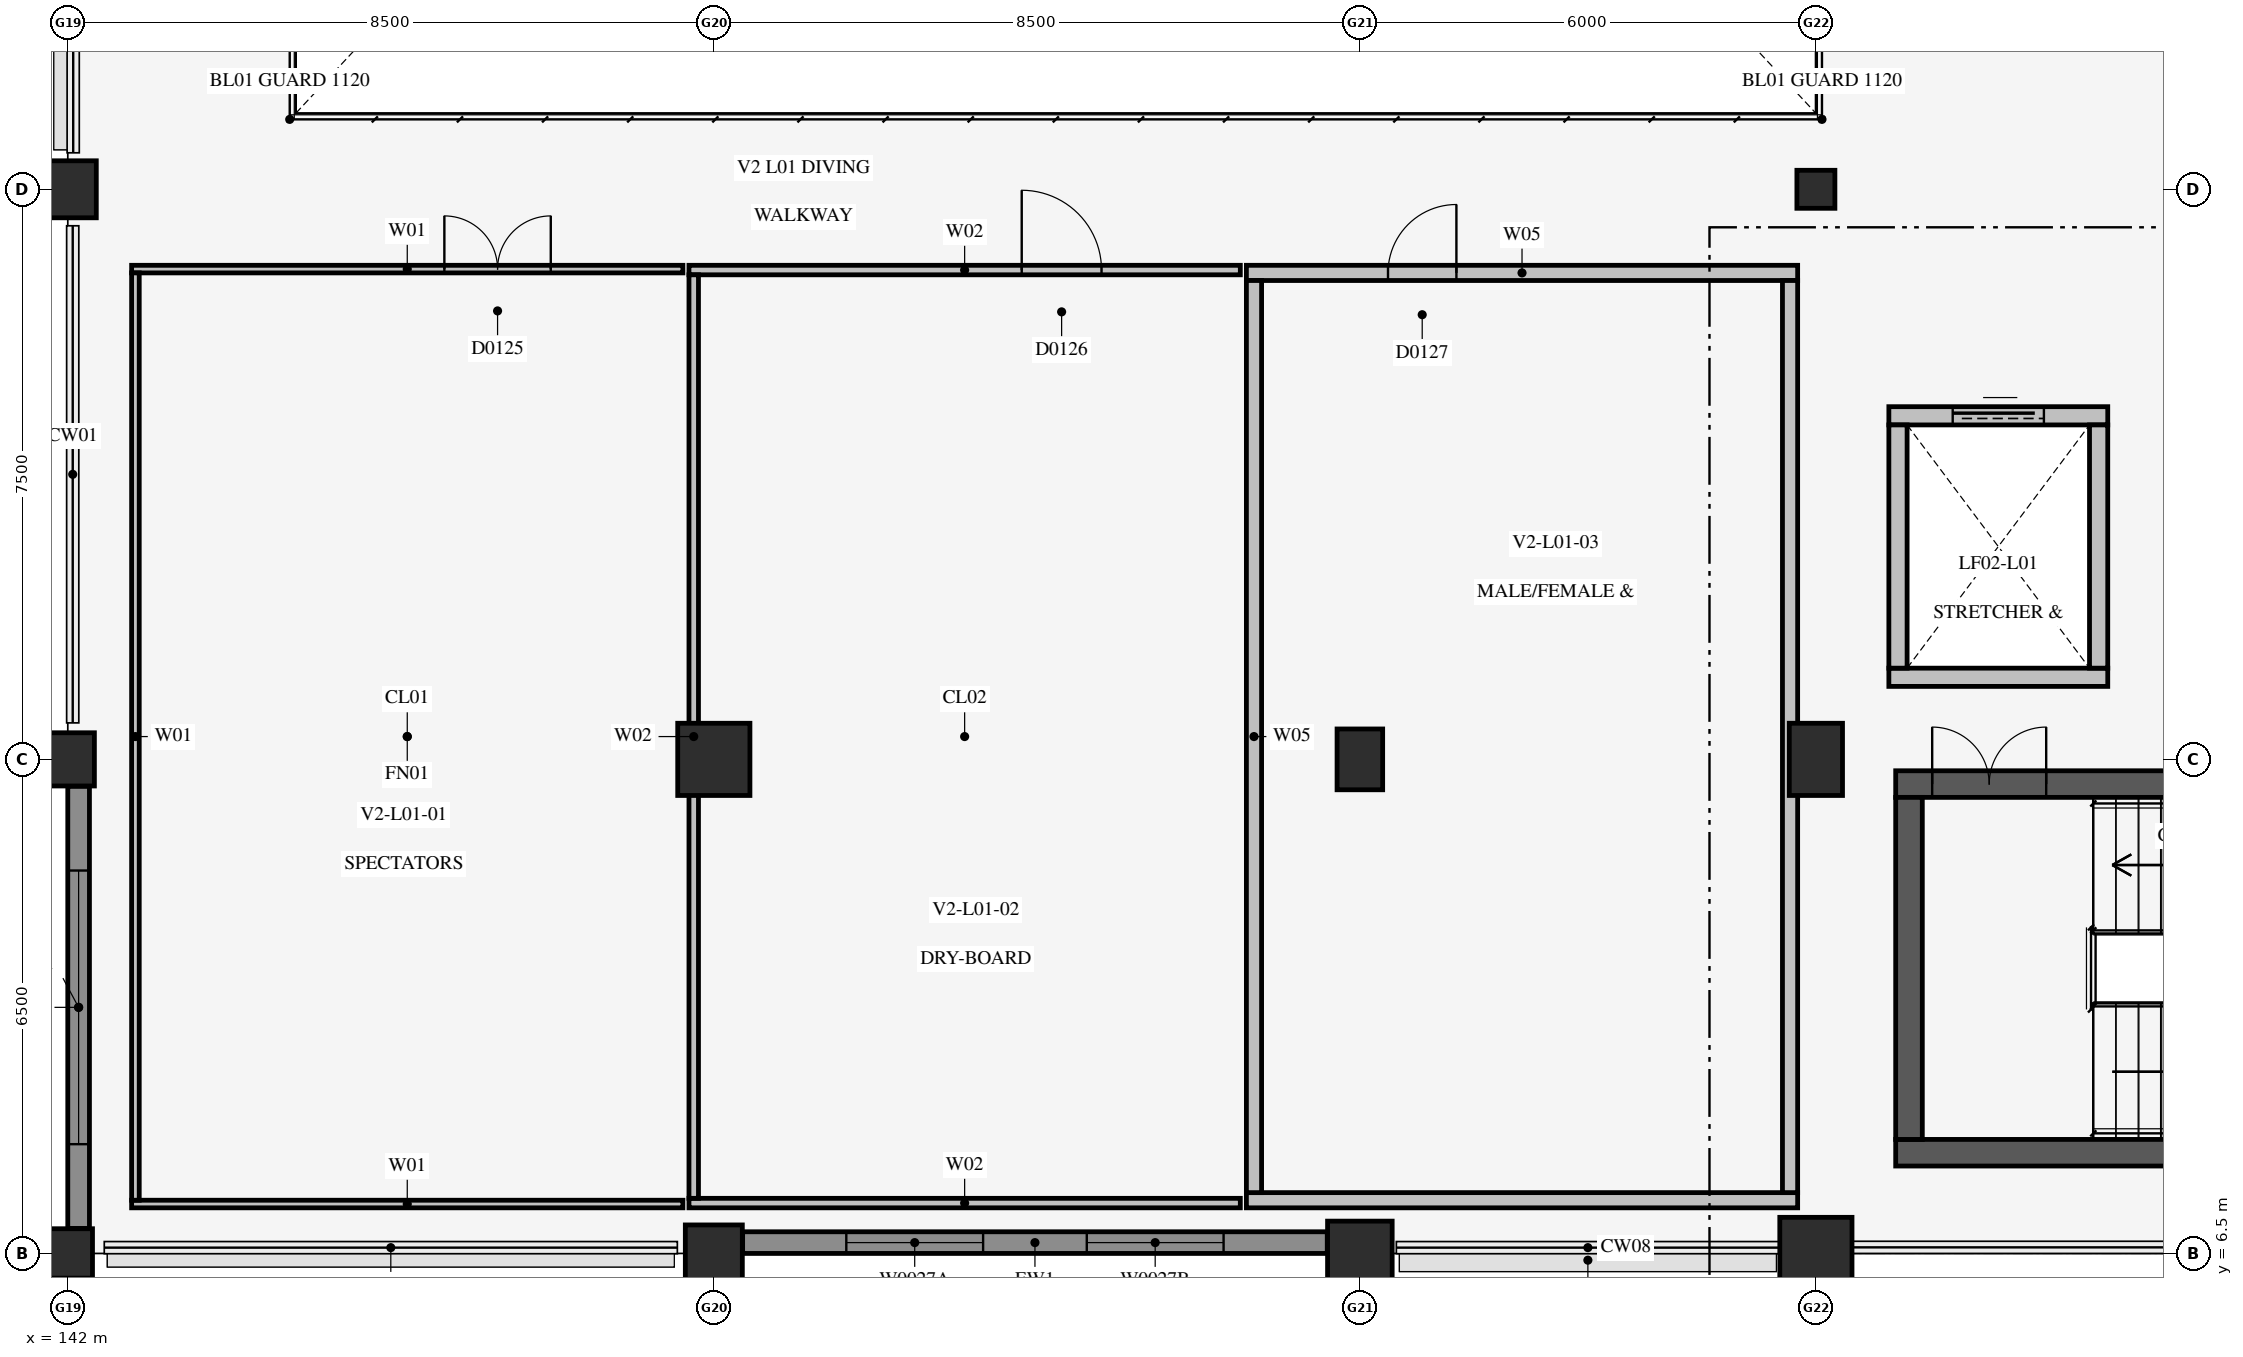
"""IFC4 building model, lengths in metres.
Left out: names, types, materials, properties, quantities, classifications, styles, units other than length and angle.
Written with IfcOpenShell. Run it as: python <this file> out.ifc"""

import sys

from ifc_helpers import new_model, si_unit, direction, frame, frame_2d, origin, origin_2d, place, context, subcontext, project, spatial, rectangle, circle, extrude, element, fill, save


model = new_model("IFC4")
c1 = context("Model", 3, precision=1e-05, world=origin(), true_north=direction((0.0, 1.0)))
c2 = subcontext(c1, "Body", "Model", "MODEL_VIEW")
j1 = project(units=[si_unit("LENGTHUNIT", "METRE"), si_unit("PLANEANGLEUNIT", "RADIAN")], contexts=[c1])
p1 = place(None, origin())
s1 = spatial("IfcSite", under=j1, at=p1, CompositionType="ELEMENT")
p2 = place(p1, origin())
s2 = spatial("IfcBuilding", under=s1, at=p2, CompositionType="ELEMENT")
p3 = place(p2, frame((0.0, 0.0, 5.4)))
s3 = spatial("IfcBuildingStorey", under=s2, at=p3, CompositionType="ELEMENT", Elevation=5.4)
p4 = place(p3, frame((166.05, 7.825, 0.0), z_axis=(0.0, 0.0, 1.0), x_axis=(1.0, 0.0, 0.0)))
e1 = element("IfcWall", 1, at=p4, inside=s3, PredefinedType="SHEAR", context=c2, shape_type="SweptSolid", body=[
    extrude(rectangle(XDim=9.5, YDim=0.35, at=frame_2d((4.75, 0.0))), origin(), (0.0, 0.0, 1.0), 4.56),
])
p5 = place(p3, frame((166.05, 12.675, 0.0), z_axis=(0.0, 0.0, 1.0), x_axis=(1.0, 0.0, 0.0)))
e2 = element("IfcWall", 2, at=p5, inside=s3, PredefinedType="SHEAR", context=c2, shape_type="SweptSolid", body=[
    extrude(rectangle(XDim=9.5, YDim=0.35, at=frame_2d((4.75, 0.0))), origin(), (0.0, 0.0, 1.0), 4.56),
])
p6 = place(p5, frame((0.48, 0.0, 0.0)))
e3 = element("IfcOpeningElement", 3, at=p6, cuts=e2, PredefinedType="OPENING", context=c2, shape_type="SweptSolid", body=[
    extrude(rectangle(XDim=1.5, YDim=2.3, at=frame_2d((0.75, 1.15))), frame((0.0, 0.187, 0.0), z_axis=(0.0, -1.0, 0.0), x_axis=(1.0, 0.0, 0.0)), (0.0, 0.0, 1.0), 0.374),
])
p7 = place(p3, frame((166.225, 8.0, 0.0), z_axis=(0.0, 0.0, 1.0), x_axis=(0.0, 1.0, 0.0)))
e4 = element("IfcWall", 4, at=p7, inside=s3, PredefinedType="SHEAR", context=c2, shape_type="SweptSolid", body=[
    extrude(rectangle(XDim=4.5, YDim=0.35, at=frame_2d((2.25, 0.0))), origin(), (0.0, 0.0, 1.0), 4.56),
])
p8 = place(p3, frame((165.96, 14.08, 0.0), z_axis=(0.0, 0.0, 1.0), x_axis=(1.0, 0.0, 0.0)))
e5 = element("IfcWall", 5, at=p8, inside=s3, PredefinedType="SOLIDWALL", context=c2, shape_type="SweptSolid", body=[
    extrude(rectangle(XDim=2.88, YDim=0.24, at=frame_2d((1.44, 0.0))), origin(), (0.0, 0.0, 1.0), 4.8),
])
p9 = place(p3, frame((165.96, 17.52, 0.0), z_axis=(0.0, 0.0, 1.0), x_axis=(1.0, 0.0, 0.0)))
e6 = element("IfcWall", 6, at=p9, inside=s3, PredefinedType="SOLIDWALL", context=c2, shape_type="SweptSolid", body=[
    extrude(rectangle(XDim=2.88, YDim=0.24, at=frame_2d((1.44, 0.0))), origin(), (0.0, 0.0, 1.0), 4.8),
])
p10 = place(p9, frame((0.84, 0.0, 0.0)))
e7 = element("IfcOpeningElement", 7, at=p10, cuts=e6, PredefinedType="OPENING", context=c2, shape_type="SweptSolid", body=[
    extrude(rectangle(XDim=1.2, YDim=2.2, at=frame_2d((0.6, 1.1))), frame((0.0, 0.132, 0.0), z_axis=(0.0, -1.0, 0.0), x_axis=(1.0, 0.0, 0.0)), (0.0, 0.0, 1.0), 0.264),
])
for number, where, z_axis, x_axis in (
    (8, (166.08, 14.2, 0.0), (0.0, 0.0, 1.0), (0.0, 1.0, 0.0)),
    (9, (168.72, 14.2, 0.0), (0.0, 0.0, 1.0), (0.0, 1.0, 0.0)),
):
    element("IfcWall", number, at=place(p3, frame(where, z_axis=z_axis, x_axis=x_axis)), inside=s3, PredefinedType="SOLIDWALL", context=c2, shape_type="SweptSolid", body=[
        extrude(rectangle(XDim=3.2, YDim=0.24, at=frame_2d((1.6, 0.0))), origin(), (0.0, 0.0, 1.0), 4.8),
    ])
p11 = place(p3, frame((142.0, 6.5, 0.0), z_axis=(0.0, 0.0, 1.0), x_axis=(1.0, 0.0, 0.0)))
e10 = element("IfcColumn", 10, at=p11, inside=s3, PredefinedType="COLUMN", context=c2, shape_type="SweptSolid", body=[
    extrude(rectangle(XDim=0.65, YDim=0.65, at=origin_2d()), origin(), (0.0, 0.0, 1.0), 4.8),
])
p12 = place(p3, frame((142.0, 13.0, 0.0), z_axis=(0.0, 0.0, 1.0), x_axis=(1.0, 0.0, 0.0)))
e11 = element("IfcColumn", 11, at=p12, inside=s3, PredefinedType="COLUMN", context=c2, shape_type="SweptSolid", body=[
    extrude(rectangle(XDim=0.7, YDim=0.7, at=origin_2d()), origin(), (0.0, 0.0, 1.0), 4.8),
])
for number, where, z_axis, x_axis in (
    (12, (142.0, 20.5, 0.0), (0.0, 0.0, 1.0), (1.0, 0.0, 0.0)),
    (13, (150.5, 6.5, 0.0), (0.0, 0.0, 1.0), (1.0, 0.0, 0.0)),
):
    element("IfcColumn", number, at=place(p3, frame(where, z_axis=z_axis, x_axis=x_axis)), inside=s3, PredefinedType="COLUMN", context=c2, shape_type="SweptSolid", body=[
        extrude(rectangle(XDim=0.75, YDim=0.75, at=origin_2d()), origin(), (0.0, 0.0, 1.0), 4.8),
    ])
p13 = place(p3, frame((150.5, 13.0, 0.0), z_axis=(0.0, 0.0, 1.0), x_axis=(1.0, 0.0, 0.0)))
e14 = element("IfcColumn", 14, at=p13, inside=s3, PredefinedType="COLUMN", context=c2, shape_type="SweptSolid", body=[
    extrude(rectangle(XDim=0.95, YDim=0.95, at=origin_2d()), origin(), (0.0, 0.0, 1.0), 4.8),
])
p14 = place(p3, frame((159.0, 6.5, 0.0), z_axis=(0.0, 0.0, 1.0), x_axis=(1.0, 0.0, 0.0)))
e15 = element("IfcColumn", 15, at=p14, inside=s3, PredefinedType="COLUMN", context=c2, shape_type="SweptSolid", body=[
    extrude(rectangle(XDim=0.85, YDim=0.85, at=origin_2d()), origin(), (0.0, 0.0, 1.0), 4.8),
])
p15 = place(p3, frame((159.0, 13.0, 0.0), z_axis=(0.0, 0.0, 1.0), x_axis=(1.0, 0.0, 0.0)))
e16 = element("IfcColumn", 16, at=p15, inside=s3, PredefinedType="COLUMN", context=c2, shape_type="SweptSolid", body=[
    extrude(rectangle(XDim=0.6, YDim=0.8, at=origin_2d()), origin(), (0.0, 0.0, 1.0), 4.8),
])
p16 = place(p3, frame((165.0, 6.5, 0.0), z_axis=(0.0, 0.0, 1.0), x_axis=(1.0, 0.0, 0.0)))
e17 = element("IfcColumn", 17, at=p16, inside=s3, PredefinedType="COLUMN", context=c2, shape_type="SweptSolid", body=[
    extrude(rectangle(XDim=0.95, YDim=0.95, at=origin_2d()), origin(), (0.0, 0.0, 1.0), 4.8),
])
p17 = place(p3, frame((165.0, 13.0, 0.0), z_axis=(0.0, 0.0, 1.0), x_axis=(1.0, 0.0, 0.0)))
e18 = element("IfcColumn", 18, at=p17, inside=s3, PredefinedType="COLUMN", context=c2, shape_type="SweptSolid", body=[
    extrude(rectangle(XDim=0.7, YDim=0.95, at=origin_2d()), origin(), (0.0, 0.0, 1.0), 4.8),
])
p18 = place(p3, frame((165.0, 20.5, 0.0), z_axis=(0.0, 0.0, 1.0), x_axis=(1.0, 0.0, 0.0)))
e19 = element("IfcColumn", 19, at=p18, inside=s3, PredefinedType="COLUMN", context=c2, shape_type="SweptSolid", body=[
    extrude(circle(Radius=0.25, at=origin_2d()), origin(), (0.0, 0.0, 1.0), 4.8),
])
p19 = place(p3, frame((142.84, 7.15, 0.0), z_axis=(0.0, 0.0, 1.0), x_axis=(1.0, 0.0, 0.0)))
e20 = element("IfcWall", 20, at=p19, inside=s3, PredefinedType="PARTITIONING", context=c2, shape_type="SweptSolid", body=[
    extrude(rectangle(XDim=7.253, YDim=0.1, at=frame_2d((3.626, 0.0))), origin(), (0.0, 0.0, 1.0), 4.545),
])
p20 = place(p3, frame((142.84, 19.45, 0.0), z_axis=(0.0, 0.0, 1.0), x_axis=(1.0, 0.0, 0.0)))
e21 = element("IfcWall", 21, at=p20, inside=s3, PredefinedType="PARTITIONING", context=c2, shape_type="SweptSolid", body=[
    extrude(rectangle(XDim=7.253, YDim=0.1, at=frame_2d((3.626, 0.0))), origin(), (0.0, 0.0, 1.0), 4.545),
])
p21 = place(p20, frame((4.115, 0.0, 0.0)))
e22 = element("IfcOpeningElement", 22, at=p21, cuts=e21, PredefinedType="OPENING", context=c2, shape_type="SweptSolid", body=[
    extrude(rectangle(XDim=1.4, YDim=2.2, at=frame_2d((0.7, 1.1))), frame((0.0, 0.062, 0.0), z_axis=(0.0, -1.0, 0.0), x_axis=(1.0, 0.0, 0.0)), (0.0, 0.0, 1.0), 0.124),
])
p22 = place(p3, frame((142.89, 7.2, 0.0), z_axis=(0.0, 0.0, 1.0), x_axis=(0.0, 1.0, 0.0)))
e23 = element("IfcWall", 23, at=p22, inside=s3, PredefinedType="PARTITIONING", context=c2, shape_type="SweptSolid", body=[
    extrude(rectangle(XDim=12.2, YDim=0.1, at=frame_2d((6.1, 0.0))), origin(), (0.0, 0.0, 1.0), 4.545),
])
p23 = place(p3, frame((150.173, 7.163, 0.0), z_axis=(0.0, 0.0, 1.0), x_axis=(1.0, 0.0, 0.0)))
e24 = element("IfcWall", 24, at=p23, inside=s3, PredefinedType="PARTITIONING", context=c2, shape_type="SweptSolid", body=[
    extrude(rectangle(XDim=7.254, YDim=0.125, at=frame_2d((3.627, 0.0))), origin(), (0.0, 0.0, 1.0), 4.545),
])
p24 = place(p3, frame((150.173, 19.438, 0.0), z_axis=(0.0, 0.0, 1.0), x_axis=(1.0, 0.0, 0.0)))
e25 = element("IfcWall", 25, at=p24, inside=s3, PredefinedType="PARTITIONING", context=c2, shape_type="SweptSolid", body=[
    extrude(rectangle(XDim=7.254, YDim=0.125, at=frame_2d((3.627, 0.0))), origin(), (0.0, 0.0, 1.0), 4.545),
])
p25 = place(p24, frame((4.378, 0.0, 0.0)))
e26 = element("IfcOpeningElement", 26, at=p25, cuts=e25, PredefinedType="OPENING", context=c2, shape_type="SweptSolid", body=[
    extrude(rectangle(XDim=1.05, YDim=2.15, at=frame_2d((0.525, 1.075))), frame((0.0, 0.074, 0.0), z_axis=(0.0, -1.0, 0.0), x_axis=(1.0, 0.0, 0.0)), (0.0, 0.0, 1.0), 0.149),
])
p26 = place(p3, frame((150.236, 7.225, 0.0), z_axis=(0.0, 0.0, 1.0), x_axis=(0.0, 1.0, 0.0)))
e27 = element("IfcWall", 27, at=p26, inside=s3, PredefinedType="PARTITIONING", context=c2, shape_type="SweptSolid", body=[
    extrude(rectangle(XDim=12.15, YDim=0.125, at=frame_2d((6.075, 0.0))), origin(), (0.0, 0.0, 1.0), 4.545),
])
p27 = place(p3, frame((157.507, 7.2, 0.0), z_axis=(0.0, 0.0, 1.0), x_axis=(1.0, 0.0, 0.0)))
e28 = element("IfcWall", 28, at=p27, inside=s3, PredefinedType="PLUMBINGWALL", context=c2, shape_type="SweptSolid", body=[
    extrude(rectangle(XDim=7.253, YDim=0.2, at=frame_2d((3.626, 0.0))), origin(), (0.0, 0.0, 1.0), 4.545),
])
p28 = place(p3, frame((157.507, 19.4, 0.0), z_axis=(0.0, 0.0, 1.0), x_axis=(1.0, 0.0, 0.0)))
e29 = element("IfcWall", 29, at=p28, inside=s3, PredefinedType="PLUMBINGWALL", context=c2, shape_type="SweptSolid", body=[
    extrude(rectangle(XDim=7.253, YDim=0.2, at=frame_2d((3.626, 0.0))), origin(), (0.0, 0.0, 1.0), 4.545),
])
p29 = place(p28, frame((1.863, 0.0, 0.0)))
e30 = element("IfcOpeningElement", 30, at=p29, cuts=e29, PredefinedType="OPENING", context=c2, shape_type="SweptSolid", body=[
    extrude(rectangle(XDim=0.9, YDim=2.1, at=frame_2d((0.45, 1.05))), frame((0.0, 0.112, 0.0), z_axis=(0.0, -1.0, 0.0), x_axis=(1.0, 0.0, 0.0)), (0.0, 0.0, 1.0), 0.224),
])
for number, where, z_axis, x_axis in (
    (31, (164.66, 7.3, 0.0), (0.0, 0.0, 1.0), (0.0, 1.0, 0.0)),
    (32, (157.607, 7.3, 0.0), (0.0, 0.0, 1.0), (0.0, 1.0, 0.0)),
):
    element("IfcWall", number, at=place(p3, frame(where, z_axis=z_axis, x_axis=x_axis)), inside=s3, PredefinedType="PLUMBINGWALL", context=c2, shape_type="SweptSolid", body=[
        extrude(rectangle(XDim=12.0, YDim=0.2, at=frame_2d((6.0, 0.0))), origin(), (0.0, 0.0, 1.0), 4.545),
    ])
p30 = place(p3, frame((150.879, 6.643, 0.0), z_axis=(0.0, 0.0, 1.0), x_axis=(1.0, 0.0, 0.0)))
e33 = element("IfcWall", 33, at=p30, inside=s3, PredefinedType="SOLIDWALL", context=c2, shape_type="SweptSolid", body=[
    extrude(rectangle(XDim=7.692, YDim=0.285, at=frame_2d((3.846, 0.0))), origin(), (0.0, 0.0, 1.0), 3.994),
])
p31 = place(p30, frame((1.364, 0.0, 0.95)))
e34 = element("IfcOpeningElement", 34, at=p31, cuts=e33, PredefinedType="OPENING", context=c2, shape_type="SweptSolid", body=[
    extrude(rectangle(XDim=1.8, YDim=1.8, at=frame_2d((0.9, 0.9))), frame((0.0, 0.154, 0.0), z_axis=(0.0, -1.0, 0.0), x_axis=(1.0, 0.0, 0.0)), (0.0, 0.0, 1.0), 0.309),
])
p32 = place(p30, frame((4.528, 0.0, 0.95)))
e35 = element("IfcOpeningElement", 35, at=p32, cuts=e33, PredefinedType="OPENING", context=c2, shape_type="SweptSolid", body=[
    extrude(rectangle(XDim=1.8, YDim=1.8, at=frame_2d((0.9, 0.9))), frame((0.0, 0.154, 0.0), z_axis=(0.0, -1.0, 0.0), x_axis=(1.0, 0.0, 0.0)), (0.0, 0.0, 1.0), 0.309),
])
p33 = place(p3, frame((142.143, 6.829, 0.0), z_axis=(0.0, 0.0, 1.0), x_axis=(0.0, 1.0, 0.0)))
e36 = element("IfcWall", 36, at=p33, inside=s3, PredefinedType="SOLIDWALL", context=c2, shape_type="SweptSolid", body=[
    extrude(rectangle(XDim=5.817, YDim=0.285, at=frame_2d((2.908, 0.0))), origin(), (0.0, 0.0, 1.0), 3.994),
])
p34 = place(p33, frame((1.108, 0.0, 0.95)))
e37 = element("IfcOpeningElement", 37, at=p34, cuts=e36, PredefinedType="OPENING", context=c2, shape_type="SweptSolid", body=[
    extrude(rectangle(XDim=3.6, YDim=1.8, at=frame_2d((1.8, 0.9))), frame((0.0, 0.154, 0.0), z_axis=(0.0, -1.0, 0.0), x_axis=(1.0, 0.0, 0.0)), (0.0, 0.0, 1.0), 0.309),
])
p35 = place(p6, frame((1.5, 0.0, 0.0), z_axis=(0.0, 0.0, 1.0), x_axis=(-1.0, 0.0, 0.0)))
e38 = element("IfcDoor", 38, at=p35, inside=s3, OperationType="DOUBLE_DOOR_SINGLE_SWING", PredefinedType="DOOR", context=c2, shape_type="SweptSolid", body=[
    extrude(rectangle(XDim=1.5, YDim=2.3, at=frame_2d((0.75, 1.15))), frame((0.0, 0.025, 0.0), z_axis=(0.0, -1.0, 0.0), x_axis=(1.0, 0.0, 0.0)), (0.0, 0.0, 1.0), 0.05),
])
fill(e3, e38)
p36 = place(p21, frame((1.4, 0.0, 0.0), z_axis=(0.0, 0.0, 1.0), x_axis=(-1.0, 0.0, 0.0)))
e39 = element("IfcDoor", 39, at=p36, inside=s3, OperationType="DOUBLE_DOOR_SINGLE_SWING", PredefinedType="DOOR", context=c2, shape_type="SweptSolid", body=[
    extrude(rectangle(XDim=1.4, YDim=2.2, at=frame_2d((0.7, 1.1))), frame((0.0, 0.025, 0.0), z_axis=(0.0, -1.0, 0.0), x_axis=(1.0, 0.0, 0.0)), (0.0, 0.0, 1.0), 0.05),
])
fill(e22, e39)
p37 = place(p25, frame((1.05, 0.0, 0.0), z_axis=(0.0, 0.0, 1.0), x_axis=(-1.0, 0.0, 0.0)))
e40 = element("IfcDoor", 40, at=p37, inside=s3, OperationType="SINGLE_SWING_LEFT", PredefinedType="DOOR", context=c2, shape_type="SweptSolid", body=[
    extrude(rectangle(XDim=1.05, YDim=2.15, at=frame_2d((0.525, 1.075))), frame((0.0, 0.025, 0.0), z_axis=(0.0, -1.0, 0.0), x_axis=(1.0, 0.0, 0.0)), (0.0, 0.0, 1.0), 0.05),
])
fill(e26, e40)
p38 = place(p29, frame((0.9, 0.0, 0.0), z_axis=(0.0, 0.0, 1.0), x_axis=(-1.0, 0.0, 0.0)))
e41 = element("IfcDoor", 41, at=p38, inside=s3, OperationType="SINGLE_SWING_RIGHT", PredefinedType="DOOR", context=c2, shape_type="SweptSolid", body=[
    extrude(rectangle(XDim=0.9, YDim=2.1, at=frame_2d((0.45, 1.05))), frame((0.0, 0.025, 0.0), z_axis=(0.0, -1.0, 0.0), x_axis=(1.0, 0.0, 0.0)), (0.0, 0.0, 1.0), 0.05),
])
fill(e30, e41)
p39 = place(p31, origin())
e42 = element("IfcWindow", 42, at=p39, inside=s3, PartitioningType="SINGLE_PANEL", PredefinedType="WINDOW", context=c2, shape_type="SweptSolid", body=[
    extrude(rectangle(XDim=1.8, YDim=1.8, at=frame_2d((0.9, 0.9))), frame((0.0, 0.03, 0.0), z_axis=(0.0, -1.0, 0.0), x_axis=(1.0, 0.0, 0.0)), (0.0, 0.0, 1.0), 0.06),
])
fill(e34, e42)
p40 = place(p32, origin())
e43 = element("IfcWindow", 43, at=p40, inside=s3, PartitioningType="SINGLE_PANEL", PredefinedType="WINDOW", context=c2, shape_type="SweptSolid", body=[
    extrude(rectangle(XDim=1.8, YDim=1.8, at=frame_2d((0.9, 0.9))), frame((0.0, 0.03, 0.0), z_axis=(0.0, -1.0, 0.0), x_axis=(1.0, 0.0, 0.0)), (0.0, 0.0, 1.0), 0.06),
])
fill(e35, e43)
p41 = place(p34, origin())
e44 = element("IfcWindow", 44, at=p41, inside=s3, PartitioningType="SINGLE_PANEL", PredefinedType="WINDOW", context=c2, shape_type="SweptSolid", body=[
    extrude(rectangle(XDim=3.6, YDim=1.8, at=frame_2d((1.8, 0.9))), frame((0.0, 0.03, 0.0), z_axis=(0.0, -1.0, 0.0), x_axis=(1.0, 0.0, 0.0)), (0.0, 0.0, 1.0), 0.06),
])
fill(e37, e44)
p42 = place(p10, origin())
e45 = element("IfcDoor", 45, at=p42, inside=s3, OperationType="SLIDING_TO_LEFT", PredefinedType="USERDEFINED", context=c2, shape_type="SweptSolid", body=[
    extrude(rectangle(XDim=1.2, YDim=2.2, at=frame_2d((0.6, 1.1))), frame((0.0, 0.025, 0.0), z_axis=(0.0, -1.0, 0.0), x_axis=(1.0, 0.0, 0.0)), (0.0, 0.0, 1.0), 0.05),
])
fill(e7, e45)
save(model, sys.argv[1])
